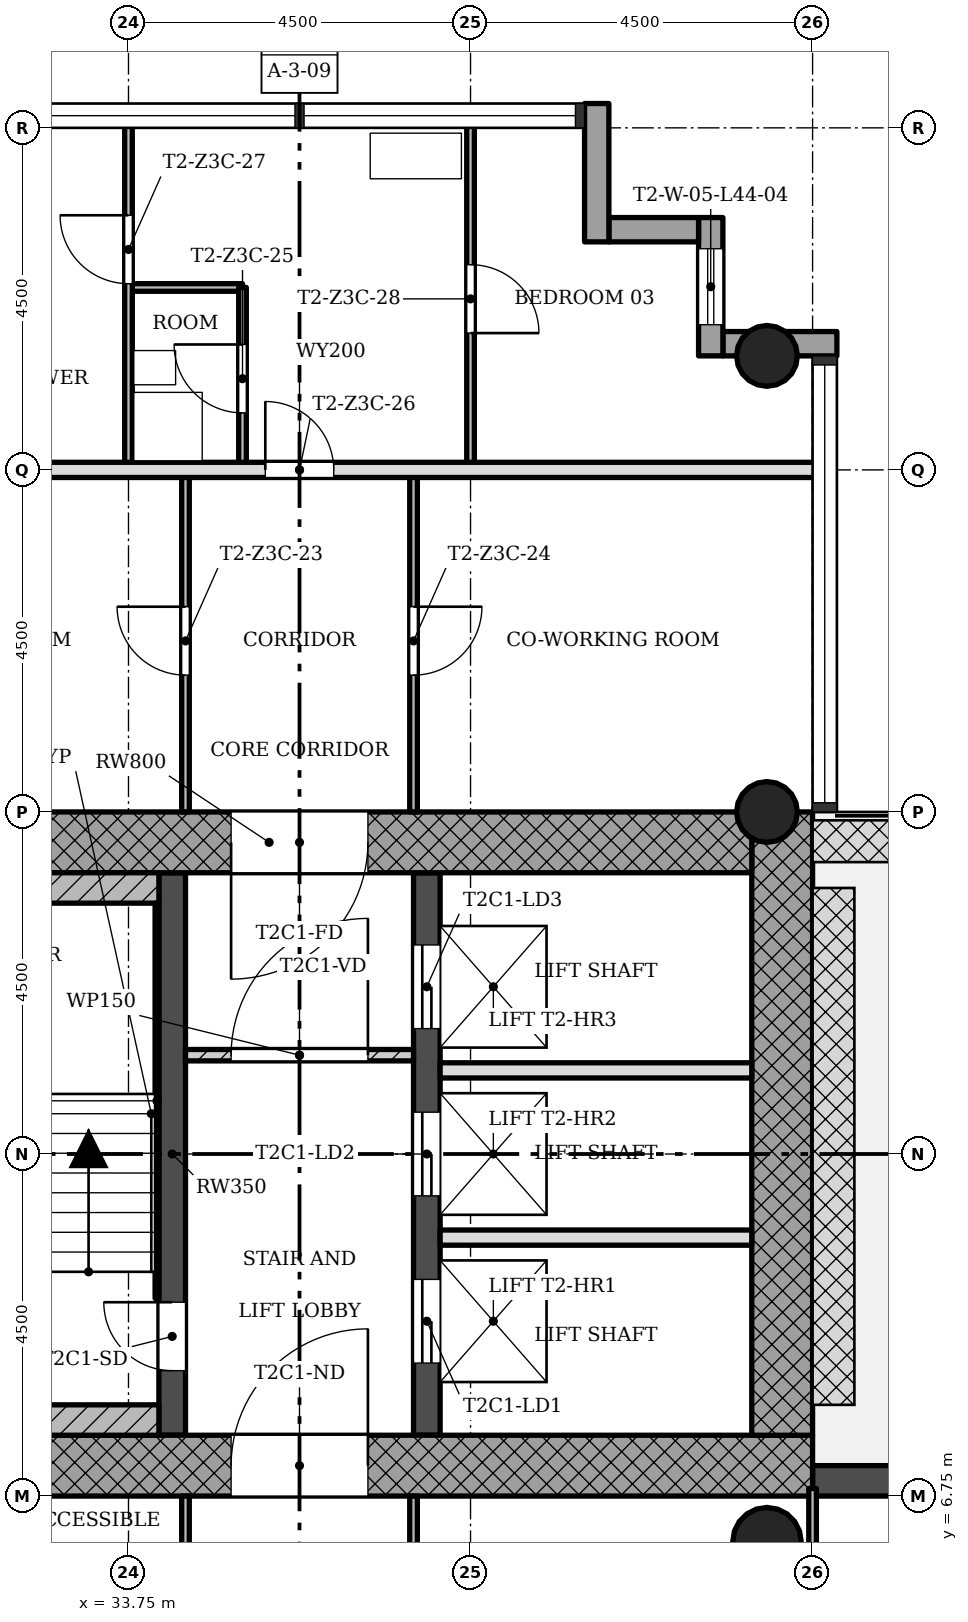
"""IFC4 building model, lengths in metres.
Left out: names, types, materials, properties, quantities, classifications, styles, units other than length and angle.
Written with IfcOpenShell. Run it as: python <this file> out.ifc"""

import sys

from ifc_helpers import new_model, si_unit, direction, frame, frame_2d, origin, origin_2d, place, context, subcontext, project, spatial, rectangle, hollow_circle, extrude, element, fill, save


model = new_model("IFC4")
c1 = context("Model", 3, precision=1e-05, world=origin(), true_north=direction((0.0, 1.0)))
c2 = subcontext(c1, "Body", "Model", "MODEL_VIEW")
j1 = project(units=[si_unit("LENGTHUNIT", "METRE"), si_unit("PLANEANGLEUNIT", "RADIAN")], contexts=[c1])
p1 = place(None, origin())
s1 = spatial("IfcSite", under=j1, at=p1, CompositionType="ELEMENT")
p2 = place(p1, origin())
s2 = spatial("IfcBuilding", under=s1, at=p2, CompositionType="ELEMENT")
p3 = place(p2, frame((0.0, 0.0, 160.9)))
s3 = spatial("IfcBuildingStorey", under=s2, at=p3, CompositionType="ELEMENT", Elevation=160.9)
p4 = place(p3, frame((30.05, 7.15, 0.0), z_axis=(0.0, 0.0, 1.0), x_axis=(1.0, 0.0, 0.0)))
e1 = element("IfcWall", 1, at=p4, inside=s3, PredefinedType="SHEAR", context=c2, shape_type="SweptSolid", body=[
    extrude(rectangle(XDim=12.7, YDim=0.8, at=frame_2d((6.35, 0.0))), origin(), (0.0, 0.0, 1.0), 3.4),
])
p5 = place(p4, frame((5.05, 0.0, 0.0)))
e2 = element("IfcOpeningElement", 2, at=p5, cuts=e1, PredefinedType="OPENING", context=c2, shape_type="SweptSolid", body=[
    extrude(rectangle(XDim=1.8, YDim=2.1, at=frame_2d((0.9, 1.05))), frame((0.0, 0.41, 0.0), z_axis=(0.0, -1.0, 0.0), x_axis=(1.0, 0.0, 0.0)), (0.0, 0.0, 1.0), 0.82),
])
p6 = place(p3, frame((42.35, 7.55, 0.0), z_axis=(0.0, 0.0, 1.0), x_axis=(0.0, 1.0, 0.0)))
e3 = element("IfcWall", 3, at=p6, inside=s3, PredefinedType="SHEAR", context=c2, shape_type="SweptSolid", body=[
    extrude(rectangle(XDim=8.2, YDim=0.8, at=frame_2d((4.1, 0.0))), origin(), (0.0, 0.0, 1.0), 3.4),
])
p7 = place(p3, frame((41.95, 15.35, 0.0), z_axis=(0.0, 0.0, 1.0), x_axis=(-1.0, 0.0, 0.0)))
e4 = element("IfcWall", 4, at=p7, inside=s3, PredefinedType="SHEAR", context=c2, shape_type="SweptSolid", body=[
    extrude(rectangle(XDim=12.7, YDim=0.8, at=frame_2d((6.35, 0.0))), origin(), (0.0, 0.0, 1.0), 3.4),
])
p8 = place(p7, frame((5.05, 0.0, 0.0)))
e5 = element("IfcOpeningElement", 5, at=p8, cuts=e4, PredefinedType="OPENING", context=c2, shape_type="SweptSolid", body=[
    extrude(rectangle(XDim=1.8, YDim=2.1, at=frame_2d((0.9, 1.05))), frame((0.0, 0.41, 0.0), z_axis=(0.0, -1.0, 0.0), x_axis=(1.0, 0.0, 0.0)), (0.0, 0.0, 1.0), 0.82),
])
p9 = place(p3, frame((34.325, 7.55, 0.0), z_axis=(0.0, 0.0, 1.0), x_axis=(0.0, 1.0, 0.0)))
e6 = element("IfcWall", 6, at=p9, inside=s3, PredefinedType="SHEAR", context=c2, shape_type="SweptSolid", body=[
    extrude(rectangle(XDim=7.4, YDim=0.35, at=frame_2d((3.7, 0.0))), origin(), (0.0, 0.0, 1.0), 3.4),
])
p10 = place(p9, frame((0.85, 0.0, 0.0)))
e7 = element("IfcOpeningElement", 7, at=p10, cuts=e6, PredefinedType="OPENING", context=c2, shape_type="SweptSolid", body=[
    extrude(rectangle(XDim=0.9, YDim=2.1, at=frame_2d((0.45, 1.05))), frame((0.0, 0.185, 0.0), z_axis=(0.0, -1.0, 0.0), x_axis=(1.0, 0.0, 0.0)), (0.0, 0.0, 1.0), 0.37),
])
p11 = place(p3, frame((37.675, 7.55, 0.0), z_axis=(0.0, 0.0, 1.0), x_axis=(0.0, 1.0, 0.0)))
e8 = element("IfcWall", 8, at=p11, inside=s3, PredefinedType="SHEAR", context=c2, shape_type="SweptSolid", body=[
    extrude(rectangle(XDim=7.4, YDim=0.35, at=frame_2d((3.7, 0.0))), origin(), (0.0, 0.0, 1.0), 3.4),
])
p12 = place(p11, frame((0.95, 0.0, 0.0)))
e9 = element("IfcOpeningElement", 9, at=p12, cuts=e8, PredefinedType="OPENING", context=c2, shape_type="SweptSolid", body=[
    extrude(rectangle(XDim=1.1, YDim=2.1, at=frame_2d((0.55, 1.05))), frame((0.0, 0.185, 0.0), z_axis=(0.0, -1.0, 0.0), x_axis=(1.0, 0.0, 0.0)), (0.0, 0.0, 1.0), 0.37),
])
p13 = place(p11, frame((3.15, 0.0, 0.0)))
e10 = element("IfcOpeningElement", 10, at=p13, cuts=e8, PredefinedType="OPENING", context=c2, shape_type="SweptSolid", body=[
    extrude(rectangle(XDim=1.1, YDim=2.1, at=frame_2d((0.55, 1.05))), frame((0.0, 0.185, 0.0), z_axis=(0.0, -1.0, 0.0), x_axis=(1.0, 0.0, 0.0)), (0.0, 0.0, 1.0), 0.37),
])
p14 = place(p11, frame((5.35, 0.0, 0.0)))
e11 = element("IfcOpeningElement", 11, at=p14, cuts=e8, PredefinedType="OPENING", context=c2, shape_type="SweptSolid", body=[
    extrude(rectangle(XDim=1.1, YDim=2.1, at=frame_2d((0.55, 1.05))), frame((0.0, 0.185, 0.0), z_axis=(0.0, -1.0, 0.0), x_axis=(1.0, 0.0, 0.0)), (0.0, 0.0, 1.0), 0.37),
])
for number, where, z_axis, x_axis in (
    (12, (42.15, 15.75, 0.0), (0.0, 0.0, 1.0), (1.0, 0.0, 0.0)),
    (13, (42.15, 21.75, 0.0), (0.0, 0.0, 1.0), (1.0, 0.0, 0.0)),
):
    element("IfcColumn", number, at=place(p3, frame(where, z_axis=z_axis, x_axis=x_axis)), inside=s3, PredefinedType="COLUMN", context=c2, shape_type="SweptSolid", body=[
        extrude(hollow_circle(Radius=0.4, WallThickness=0.028, at=origin_2d()), origin(), (0.0, 0.0, 1.0), 3.4),
    ])
p15 = place(p3, frame((42.15, 6.15, 0.0), z_axis=(0.0, 0.0, 1.0), x_axis=(1.0, 0.0, 0.0)))
e14 = element("IfcColumn", 14, at=p15, inside=s3, PredefinedType="COLUMN", context=c2, shape_type="SweptSolid", body=[
    extrude(hollow_circle(Radius=0.45, WallThickness=0.032, at=origin_2d()), origin(), (0.0, 0.0, 1.0), 3.4),
])
p16 = place(p3, frame((47.25, 6.95, -0.02), z_axis=(0.0, 0.0, 1.0), x_axis=(-1.0, 0.0, 0.0)))
e15 = element("IfcWall", 15, at=p16, inside=s3, PredefinedType="STANDARD", context=c2, shape_type="SweptSolid", body=[
    extrude(rectangle(XDim=4.5, YDim=0.4, at=frame_2d((2.25, 0.0))), origin(), (0.0, 0.0, 1.0), 3.12),
])
p17 = place(p16, frame((1.35, 0.0, 0.02)))
e16 = element("IfcOpeningElement", 16, at=p17, cuts=e15, PredefinedType="OPENING", context=c2, shape_type="SweptSolid", body=[
    extrude(rectangle(XDim=1.8, YDim=2.1, at=frame_2d((0.9, 1.05))), frame((0.0, 0.21, 0.0), z_axis=(0.0, -1.0, 0.0), x_axis=(1.0, 0.0, 0.0)), (0.0, 0.0, 1.0), 0.42),
])
p18 = place(p3, frame((43.07, 21.91, -0.3), z_axis=(0.0, 0.0, 1.0), x_axis=(-1.0, 0.0, 0.0)))
e17 = element("IfcWall", 17, at=p18, inside=s3, PredefinedType="STANDARD", context=c2, shape_type="SweptSolid", body=[
    extrude(rectangle(XDim=1.5, YDim=0.32, at=frame_2d((0.75, 0.0))), origin(), (0.0, 0.0, 1.0), 3.4),
])
p19 = place(p3, frame((41.41, 21.75, -0.3), z_axis=(0.0, 0.0, 1.0), x_axis=(0.0, 1.0, 0.0)))
e18 = element("IfcWall", 18, at=p19, inside=s3, PredefinedType="STANDARD", context=c2, shape_type="SweptSolid", body=[
    extrude(rectangle(XDim=1.82, YDim=0.32, at=frame_2d((0.91, 0.0))), origin(), (0.0, 0.0, 1.0), 3.4),
])
p20 = place(p19, frame((0.41, 0.0, 1.2)))
e19 = element("IfcOpeningElement", 19, at=p20, cuts=e18, PredefinedType="OPENING", context=c2, shape_type="SweptSolid", body=[
    extrude(rectangle(XDim=1.0, YDim=1.5, at=frame_2d((0.5, 0.75))), frame((0.0, 0.17, 0.0), z_axis=(0.0, -1.0, 0.0), x_axis=(1.0, 0.0, 0.0)), (0.0, 0.0, 1.0), 0.34),
])
p21 = place(p3, frame((41.25, 23.41, -0.3), z_axis=(0.0, 0.0, 1.0), x_axis=(-1.0, 0.0, 0.0)))
e20 = element("IfcWall", 20, at=p21, inside=s3, PredefinedType="STANDARD", context=c2, shape_type="SweptSolid", body=[
    extrude(rectangle(XDim=1.18, YDim=0.32, at=frame_2d((0.59, 0.0))), origin(), (0.0, 0.0, 1.0), 3.4),
])
p22 = place(p3, frame((39.91, 23.25, -0.3), z_axis=(0.0, 0.0, 1.0), x_axis=(0.0, 1.0, 0.0)))
e21 = element("IfcWall", 21, at=p22, inside=s3, PredefinedType="STANDARD", context=c2, shape_type="SweptSolid", body=[
    extrude(rectangle(XDim=1.82, YDim=0.32, at=frame_2d((0.91, 0.0))), origin(), (0.0, 0.0, 1.0), 3.4),
])
p23 = place(p3, frame((37.5, 12.55, 0.0), z_axis=(0.0, 0.0, 1.0), x_axis=(-1.0, 0.0, 0.0)))
e22 = element("IfcWall", 22, at=p23, inside=s3, PredefinedType="PARTITIONING", context=c2, shape_type="SweptSolid", body=[
    extrude(rectangle(XDim=3.0, YDim=0.15, at=frame_2d((1.5, 0.0))), origin(), (0.0, 0.0, 1.0), 3.0),
])
p24 = place(p23, frame((0.6, 0.0, 0.0)))
e23 = element("IfcOpeningElement", 23, at=p24, cuts=e22, PredefinedType="OPENING", context=c2, shape_type="SweptSolid", body=[
    extrude(rectangle(XDim=1.8, YDim=2.1, at=frame_2d((0.9, 1.05))), frame((0.0, 0.085, 0.0), z_axis=(0.0, -1.0, 0.0), x_axis=(1.0, 0.0, 0.0)), (0.0, 0.0, 1.0), 0.17),
])
for number, where, z_axis, x_axis in (
    (24, (41.95, 10.15, 0.0), (0.0, 0.0, 1.0), (-1.0, 0.0, 0.0)),
    (25, (41.95, 12.35, 0.0), (0.0, 0.0, 1.0), (-1.0, 0.0, 0.0)),
):
    element("IfcWall", number, at=place(p3, frame(where, z_axis=z_axis, x_axis=x_axis)), inside=s3, PredefinedType="SOLIDWALL", context=c2, shape_type="SweptSolid", body=[
        extrude(rectangle(XDim=4.1, YDim=0.2, at=frame_2d((2.05, 0.0))), origin(), (0.0, 0.0, 1.0), 3.0),
    ])
p25 = place(p3, frame((42.85, 20.25, 0.0), z_axis=(0.0, 0.0, 1.0), x_axis=(-1.0, 0.0, 0.0)))
e26 = element("IfcWall", 26, at=p25, inside=s3, PredefinedType="SOLIDWALL", context=c2, shape_type="SweptSolid", body=[
    extrude(rectangle(XDim=13.7, YDim=0.2, at=frame_2d((6.85, 0.0))), origin(), (0.0, 0.0, 1.0), 3.0),
])
p26 = place(p25, frame((6.4, 0.0, 0.0)))
e27 = element("IfcOpeningElement", 27, at=p26, cuts=e26, PredefinedType="OPENING", context=c2, shape_type="SweptSolid", body=[
    extrude(rectangle(XDim=0.9, YDim=2.1, at=frame_2d((0.45, 1.05))), frame((0.0, 0.11, 0.0), z_axis=(0.0, -1.0, 0.0), x_axis=(1.0, 0.0, 0.0)), (0.0, 0.0, 1.0), 0.22),
])
p27 = place(p3, frame((35.25, 22.65, 0.0), z_axis=(0.0, 0.0, 1.0), x_axis=(-1.0, 0.0, 0.0)))
e28 = element("IfcWall", 28, at=p27, inside=s3, PredefinedType="PARTITIONING", context=c2, shape_type="SweptSolid", body=[
    extrude(rectangle(XDim=1.5, YDim=0.1, at=frame_2d((0.75, 0.0))), origin(), (0.0, 0.0, 1.0), 3.0),
])
p28 = place(p3, frame((42.75, 0.9, 0.0), z_axis=(0.0, 0.0, 1.0), x_axis=(0.0, 1.0, 0.0)))
e29 = element("IfcWall", 29, at=p28, inside=s3, PredefinedType="PARTITIONING", context=c2, shape_type="SweptSolid", body=[
    extrude(rectangle(XDim=5.95, YDim=0.1, at=frame_2d((2.975, 0.0))), origin(), (0.0, 0.0, 1.0), 3.0),
])
p29 = place(p3, frame((38.25, 20.25, 0.0), z_axis=(0.0, 0.0, 1.0), x_axis=(0.0, 1.0, 0.0)))
e30 = element("IfcWall", 30, at=p29, inside=s3, PredefinedType="PARTITIONING", context=c2, shape_type="SweptSolid", body=[
    extrude(rectangle(XDim=4.6, YDim=0.1, at=frame_2d((2.3, 0.0))), origin(), (0.0, 0.0, 1.0), 3.0),
])
p30 = place(p29, frame((1.8, 0.0, 0.0)))
e31 = element("IfcOpeningElement", 31, at=p30, cuts=e30, PredefinedType="OPENING", context=c2, shape_type="SweptSolid", body=[
    extrude(rectangle(XDim=0.9, YDim=2.1, at=frame_2d((0.45, 1.05))), frame((0.0, 0.06, 0.0), z_axis=(0.0, -1.0, 0.0), x_axis=(1.0, 0.0, 0.0)), (0.0, 0.0, 1.0), 0.12),
])
p31 = place(p3, frame((37.5, 4.5, 0.0), z_axis=(0.0, 0.0, 1.0), x_axis=(0.0, 1.0, 0.0)))
e32 = element("IfcWall", 32, at=p31, inside=s3, PredefinedType="PARTITIONING", context=c2, shape_type="SweptSolid", body=[
    extrude(rectangle(XDim=2.25, YDim=0.1, at=frame_2d((1.125, 0.0))), origin(), (0.0, 0.0, 1.0), 3.0),
])
p32 = place(p3, frame((37.5, 15.75, 0.0), z_axis=(0.0, 0.0, 1.0), x_axis=(0.0, 1.0, 0.0)))
e33 = element("IfcWall", 33, at=p32, inside=s3, PredefinedType="PARTITIONING", context=c2, shape_type="SweptSolid", body=[
    extrude(rectangle(XDim=4.5, YDim=0.1, at=frame_2d((2.25, 0.0))), origin(), (0.0, 0.0, 1.0), 3.0),
])
p33 = place(p32, frame((1.8, 0.0, 0.0)))
e34 = element("IfcOpeningElement", 34, at=p33, cuts=e33, PredefinedType="OPENING", context=c2, shape_type="SweptSolid", body=[
    extrude(rectangle(XDim=0.9, YDim=2.1, at=frame_2d((0.45, 1.05))), frame((0.0, 0.06, 0.0), z_axis=(0.0, -1.0, 0.0), x_axis=(1.0, 0.0, 0.0)), (0.0, 0.0, 1.0), 0.12),
])
p34 = place(p3, frame((35.25, 20.25, 0.0), z_axis=(0.0, 0.0, 1.0), x_axis=(0.0, 1.0, 0.0)))
e35 = element("IfcWall", 35, at=p34, inside=s3, PredefinedType="PARTITIONING", context=c2, shape_type="SweptSolid", body=[
    extrude(rectangle(XDim=2.4, YDim=0.1, at=frame_2d((1.2, 0.0))), origin(), (0.0, 0.0, 1.0), 3.0),
])
p35 = place(p34, frame((0.75, 0.0, 0.0)))
e36 = element("IfcOpeningElement", 36, at=p35, cuts=e35, PredefinedType="OPENING", context=c2, shape_type="SweptSolid", body=[
    extrude(rectangle(XDim=0.9, YDim=2.1, at=frame_2d((0.45, 1.05))), frame((0.0, 0.06, 0.0), z_axis=(0.0, -1.0, 0.0), x_axis=(1.0, 0.0, 0.0)), (0.0, 0.0, 1.0), 0.12),
])
p36 = place(p3, frame((34.5, 4.5, 0.0), z_axis=(0.0, 0.0, 1.0), x_axis=(0.0, 1.0, 0.0)))
e37 = element("IfcWall", 37, at=p36, inside=s3, PredefinedType="PARTITIONING", context=c2, shape_type="SweptSolid", body=[
    extrude(rectangle(XDim=2.25, YDim=0.1, at=frame_2d((1.125, 0.0))), origin(), (0.0, 0.0, 1.0), 3.0),
])
p37 = place(p36, frame((0.675, 0.0, 0.0)))
e38 = element("IfcOpeningElement", 38, at=p37, cuts=e37, PredefinedType="OPENING", context=c2, shape_type="SweptSolid", body=[
    extrude(rectangle(XDim=0.9, YDim=2.1, at=frame_2d((0.45, 1.05))), frame((0.0, 0.06, 0.0), z_axis=(0.0, -1.0, 0.0), x_axis=(1.0, 0.0, 0.0)), (0.0, 0.0, 1.0), 0.12),
])
p38 = place(p3, frame((34.5, 15.75, 0.0), z_axis=(0.0, 0.0, 1.0), x_axis=(0.0, 1.0, 0.0)))
e39 = element("IfcWall", 39, at=p38, inside=s3, PredefinedType="PARTITIONING", context=c2, shape_type="SweptSolid", body=[
    extrude(rectangle(XDim=4.5, YDim=0.1, at=frame_2d((2.25, 0.0))), origin(), (0.0, 0.0, 1.0), 3.0),
])
p39 = place(p38, frame((1.8, 0.0, 0.0)))
e40 = element("IfcOpeningElement", 40, at=p39, cuts=e39, PredefinedType="OPENING", context=c2, shape_type="SweptSolid", body=[
    extrude(rectangle(XDim=0.9, YDim=2.1, at=frame_2d((0.45, 1.05))), frame((0.0, 0.06, 0.0), z_axis=(0.0, -1.0, 0.0), x_axis=(1.0, 0.0, 0.0)), (0.0, 0.0, 1.0), 0.12),
])
p40 = place(p3, frame((33.75, 20.25, 0.0), z_axis=(0.0, 0.0, 1.0), x_axis=(0.0, 1.0, 0.0)))
e41 = element("IfcWall", 41, at=p40, inside=s3, PredefinedType="PARTITIONING", context=c2, shape_type="SweptSolid", body=[
    extrude(rectangle(XDim=4.6, YDim=0.1, at=frame_2d((2.3, 0.0))), origin(), (0.0, 0.0, 1.0), 3.0),
])
p41 = place(p40, frame((2.45, 0.0, 0.0)))
e42 = element("IfcOpeningElement", 42, at=p41, cuts=e41, PredefinedType="OPENING", context=c2, shape_type="SweptSolid", body=[
    extrude(rectangle(XDim=0.9, YDim=2.1, at=frame_2d((0.45, 1.05))), frame((0.0, 0.06, 0.0), z_axis=(0.0, -1.0, 0.0), x_axis=(1.0, 0.0, 0.0)), (0.0, 0.0, 1.0), 0.12),
])
for number, where, z_axis, x_axis in (
    (43, (34.15, 14.75, 0.0), (0.0, 0.0, 1.0), (-1.0, 0.0, 0.0)),
    (44, (34.15, 7.75, 0.0), (0.0, 0.0, 1.0), (-1.0, 0.0, 0.0)),
):
    element("IfcWall", number, at=place(p3, frame(where, z_axis=z_axis, x_axis=x_axis)), inside=s3, PredefinedType="SHEAR", context=c2, shape_type="SweptSolid", body=[
        extrude(rectangle(XDim=4.1, YDim=0.4, at=frame_2d((2.05, 0.0))), origin(), (0.0, 0.0, 1.0), 3.4),
    ])
p42 = place(p3, frame((34.125, 9.35, 0.0), z_axis=(0.0, 0.0, 1.0), x_axis=(0.0, 1.0, 0.0)))
e45 = element("IfcWall", 45, at=p42, inside=s3, PredefinedType="SHEAR", context=c2, shape_type="SweptSolid", body=[
    extrude(rectangle(XDim=5.2, YDim=0.05, at=frame_2d((2.6, 0.0))), origin(), (0.0, 0.0, 1.0), 3.4),
])
p43 = place(p24, origin())
e46 = element("IfcDoor", 46, at=p43, inside=s3, OperationType="SINGLE_SWING_LEFT", PredefinedType="DOOR", context=c2, shape_type="SweptSolid", body=[
    extrude(rectangle(XDim=1.8, YDim=2.1, at=frame_2d((0.9, 1.05))), frame((0.0, 0.025, 0.0), z_axis=(0.0, -1.0, 0.0), x_axis=(1.0, 0.0, 0.0)), (0.0, 0.0, 1.0), 0.05),
])
fill(e23, e46)
p44 = place(p39, origin())
e47 = element("IfcDoor", 47, at=p44, inside=s3, OperationType="SINGLE_SWING_LEFT", PredefinedType="DOOR", context=c2, shape_type="SweptSolid", body=[
    extrude(rectangle(XDim=0.9, YDim=2.1, at=frame_2d((0.45, 1.05))), frame((0.0, 0.025, 0.0), z_axis=(0.0, -1.0, 0.0), x_axis=(1.0, 0.0, 0.0)), (0.0, 0.0, 1.0), 0.05),
])
fill(e40, e47)
p45 = place(p33, origin())
e48 = element("IfcDoor", 48, at=p45, inside=s3, OperationType="SINGLE_SWING_RIGHT", PredefinedType="DOOR", context=c2, shape_type="SweptSolid", body=[
    extrude(rectangle(XDim=0.9, YDim=2.1, at=frame_2d((0.45, 1.05))), frame((0.0, 0.025, 0.0), z_axis=(0.0, -1.0, 0.0), x_axis=(1.0, 0.0, 0.0)), (0.0, 0.0, 1.0), 0.05),
])
fill(e34, e48)
p46 = place(p35, origin())
e49 = element("IfcDoor", 49, at=p46, inside=s3, OperationType="SINGLE_SWING_LEFT", PredefinedType="DOOR", context=c2, shape_type="SweptSolid", body=[
    extrude(rectangle(XDim=0.9, YDim=2.1, at=frame_2d((0.45, 1.05))), frame((0.0, 0.025, 0.0), z_axis=(0.0, -1.0, 0.0), x_axis=(1.0, 0.0, 0.0)), (0.0, 0.0, 1.0), 0.05),
])
fill(e36, e49)
p47 = place(p26, origin())
e50 = element("IfcDoor", 50, at=p47, inside=s3, OperationType="SINGLE_SWING_RIGHT", PredefinedType="DOOR", context=c2, shape_type="SweptSolid", body=[
    extrude(rectangle(XDim=0.9, YDim=2.1, at=frame_2d((0.45, 1.05))), frame((0.0, 0.025, 0.0), z_axis=(0.0, -1.0, 0.0), x_axis=(1.0, 0.0, 0.0)), (0.0, 0.0, 1.0), 0.05),
])
fill(e27, e50)
p48 = place(p41, origin())
e51 = element("IfcDoor", 51, at=p48, inside=s3, OperationType="SINGLE_SWING_LEFT", PredefinedType="DOOR", context=c2, shape_type="SweptSolid", body=[
    extrude(rectangle(XDim=0.9, YDim=2.1, at=frame_2d((0.45, 1.05))), frame((0.0, 0.025, 0.0), z_axis=(0.0, -1.0, 0.0), x_axis=(1.0, 0.0, 0.0)), (0.0, 0.0, 1.0), 0.05),
])
fill(e42, e51)
p49 = place(p30, origin())
e52 = element("IfcDoor", 52, at=p49, inside=s3, OperationType="SINGLE_SWING_LEFT", PredefinedType="DOOR", context=c2, shape_type="SweptSolid", body=[
    extrude(rectangle(XDim=0.9, YDim=2.1, at=frame_2d((0.45, 1.05))), frame((0.0, 0.025, 0.0), z_axis=(0.0, -1.0, 0.0), x_axis=(1.0, 0.0, 0.0)), (0.0, 0.0, 1.0), 0.05),
])
fill(e31, e52)
p50 = place(p10, origin())
e53 = element("IfcDoor", 53, at=p50, inside=s3, OperationType="SINGLE_SWING_LEFT", PredefinedType="DOOR", context=c2, shape_type="SweptSolid", body=[
    extrude(rectangle(XDim=0.9, YDim=2.1, at=frame_2d((0.45, 1.05))), frame((0.0, 0.025, 0.0), z_axis=(0.0, -1.0, 0.0), x_axis=(1.0, 0.0, 0.0)), (0.0, 0.0, 1.0), 0.05),
])
fill(e7, e53)
p51 = place(p12, origin())
e54 = element("IfcDoor", 54, at=p51, inside=s3, OperationType="SLIDING_TO_LEFT", PredefinedType="DOOR", context=c2, shape_type="SweptSolid", body=[
    extrude(rectangle(XDim=1.1, YDim=2.1, at=frame_2d((0.55, 1.05))), frame((0.0, 0.025, 0.0), z_axis=(0.0, -1.0, 0.0), x_axis=(1.0, 0.0, 0.0)), (0.0, 0.0, 1.0), 0.05),
])
fill(e9, e54)
p52 = place(p13, origin())
e55 = element("IfcDoor", 55, at=p52, inside=s3, OperationType="SLIDING_TO_LEFT", PredefinedType="DOOR", context=c2, shape_type="SweptSolid", body=[
    extrude(rectangle(XDim=1.1, YDim=2.1, at=frame_2d((0.55, 1.05))), frame((0.0, 0.025, 0.0), z_axis=(0.0, -1.0, 0.0), x_axis=(1.0, 0.0, 0.0)), (0.0, 0.0, 1.0), 0.05),
])
fill(e10, e55)
p53 = place(p14, origin())
e56 = element("IfcDoor", 56, at=p53, inside=s3, OperationType="SLIDING_TO_LEFT", PredefinedType="DOOR", context=c2, shape_type="SweptSolid", body=[
    extrude(rectangle(XDim=1.1, YDim=2.1, at=frame_2d((0.55, 1.05))), frame((0.0, 0.025, 0.0), z_axis=(0.0, -1.0, 0.0), x_axis=(1.0, 0.0, 0.0)), (0.0, 0.0, 1.0), 0.05),
])
fill(e11, e56)
p54 = place(p5, origin())
e57 = element("IfcDoor", 57, at=p54, inside=s3, OperationType="SINGLE_SWING_LEFT", PredefinedType="DOOR", context=c2, shape_type="SweptSolid", body=[
    extrude(rectangle(XDim=1.8, YDim=2.1, at=frame_2d((0.9, 1.05))), frame((0.0, 0.025, 0.0), z_axis=(0.0, -1.0, 0.0), x_axis=(1.0, 0.0, 0.0)), (0.0, 0.0, 1.0), 0.05),
])
fill(e2, e57)
p55 = place(p8, origin())
e58 = element("IfcDoor", 58, at=p55, inside=s3, OperationType="SINGLE_SWING_LEFT", PredefinedType="DOOR", context=c2, shape_type="SweptSolid", body=[
    extrude(rectangle(XDim=1.8, YDim=2.1, at=frame_2d((0.9, 1.05))), frame((0.0, 0.025, 0.0), z_axis=(0.0, -1.0, 0.0), x_axis=(1.0, 0.0, 0.0)), (0.0, 0.0, 1.0), 0.05),
])
fill(e5, e58)
p56 = place(p20, origin())
e59 = element("IfcWindow", 59, at=p56, inside=s3, PartitioningType="SINGLE_PANEL", PredefinedType="WINDOW", context=c2, shape_type="SweptSolid", body=[
    extrude(rectangle(XDim=1.0, YDim=1.5, at=frame_2d((0.5, 0.75))), frame((0.0, 0.03, 0.0), z_axis=(0.0, -1.0, 0.0), x_axis=(1.0, 0.0, 0.0)), (0.0, 0.0, 1.0), 0.06),
])
fill(e19, e59)
save(model, sys.argv[1])
